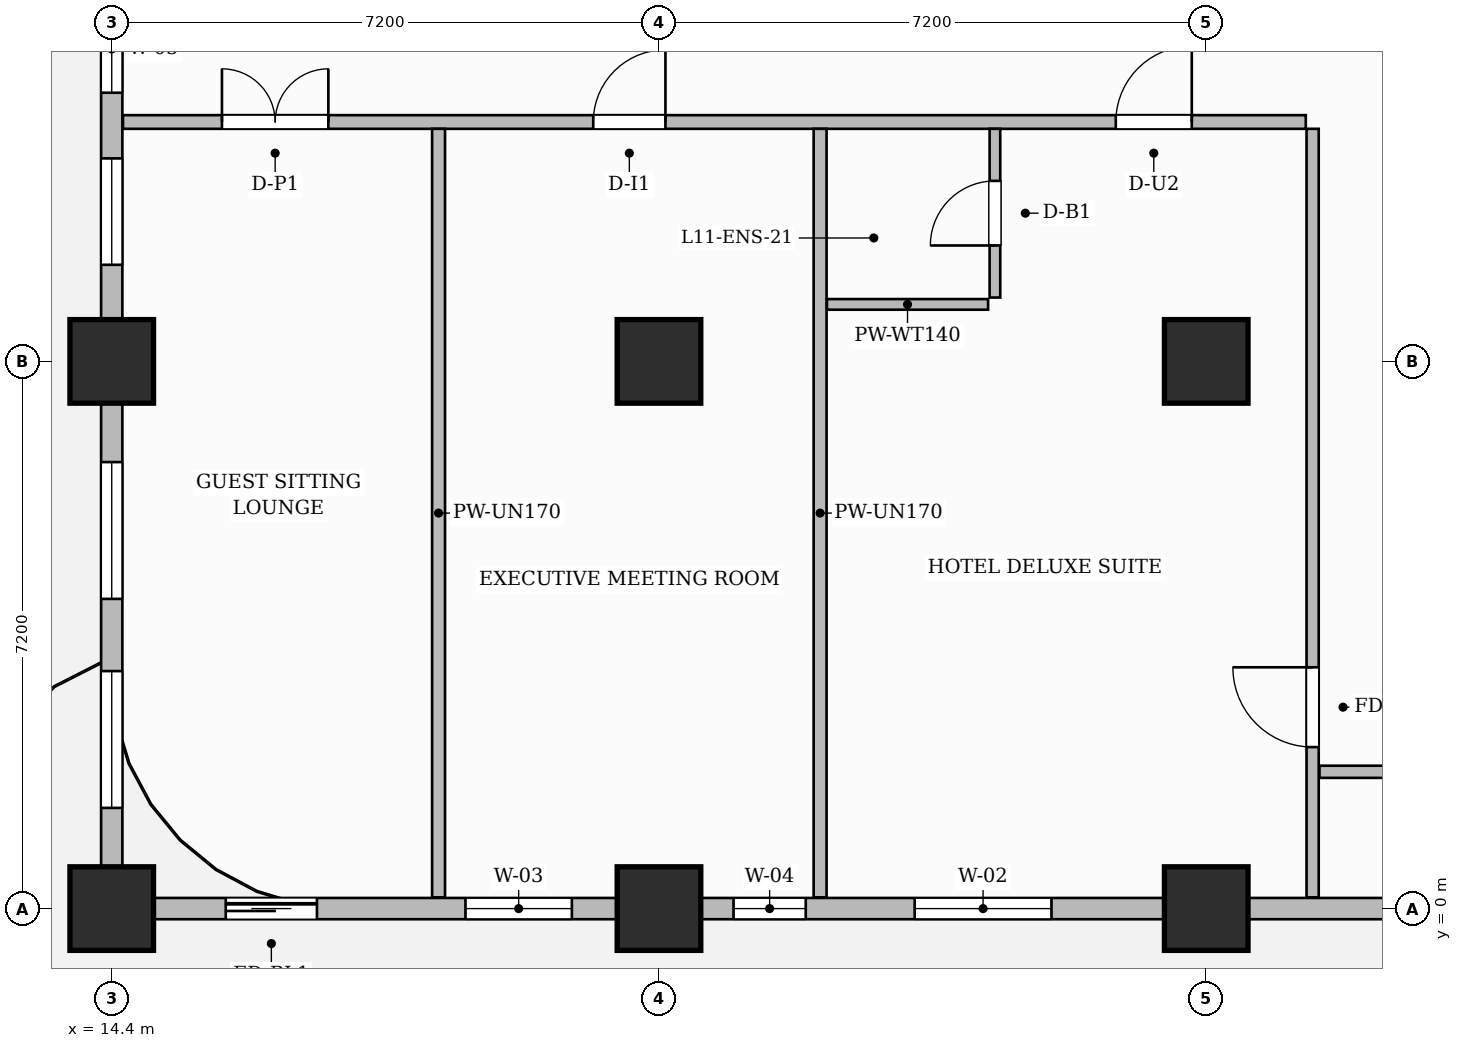
"""IFC4 building model, lengths in metres.
Left out: names, types, materials, properties, quantities, classifications, styles, units other than length and angle.
Written with IfcOpenShell. Run it as: python <this file> out.ifc"""

import sys

from ifc_helpers import new_model, si_unit, direction, frame, frame_2d, origin, origin_2d, place, context, subcontext, project, spatial, rectangle, extrude, source, transform, mapped, element, fill, save


model = new_model("IFC4")
c1 = context("Model", 3, precision=1e-05, world=origin(), true_north=direction((0.0, 1.0)))
c2 = subcontext(c1, "Body", "Model", "MODEL_VIEW")
j1 = project(units=[si_unit("LENGTHUNIT", "METRE"), si_unit("PLANEANGLEUNIT", "RADIAN")], contexts=[c1])
p1 = place(None, origin())
s1 = spatial("IfcSite", under=j1, at=p1, CompositionType="ELEMENT")
p2 = place(p1, origin())
s2 = spatial("IfcBuilding", under=s1, at=p2, CompositionType="ELEMENT")
p3 = place(p2, frame((0.0, 0.0, 50.9)))
s3 = spatial("IfcBuildingStorey", under=s2, at=p3, CompositionType="ELEMENT", Elevation=50.9)
m1 = source(origin(), c2, "Body", "SweptSolid", [
    extrude(rectangle(XDim=1.1, YDim=1.1, at=origin_2d()), origin(), (0.0, 0.0, 1.0), 3.7),
])
for number, where, z_axis, x_axis in (
    (1, (14.4, 0.0, 0.0), (0.0, 0.0, 1.0), (1.0, 0.0, 0.0)),
    (2, (14.4, 7.2, 0.0), (0.0, 0.0, 1.0), (1.0, 0.0, 0.0)),
    (3, (21.6, 0.0, 0.0), (0.0, 0.0, 1.0), (1.0, 0.0, 0.0)),
    (4, (21.6, 7.2, 0.0), (0.0, 0.0, 1.0), (1.0, 0.0, 0.0)),
    (5, (28.8, 0.0, 0.0), (0.0, 0.0, 1.0), (1.0, 0.0, 0.0)),
    (6, (28.8, 7.2, 0.0), (0.0, 0.0, 1.0), (1.0, 0.0, 0.0)),
):
    element("IfcColumn", number, at=place(p3, frame(where, z_axis=z_axis, x_axis=x_axis)), inside=s3, PredefinedType="COLUMN", context=c2, shape_type="MappedRepresentation", body=[
        mapped(m1, transform((0.0, 0.0, 0.0), scale=1.0)),
    ])
p4 = place(p3, frame((14.548, 10.35, 0.0), z_axis=(0.0, 0.0, 1.0), x_axis=(1.0, 0.0, 0.0)))
e7 = element("IfcWall", 7, at=p4, inside=s3, PredefinedType="PARTITIONING", context=c2, shape_type="SweptSolid", body=[
    extrude(rectangle(XDim=15.562, YDim=0.18, at=frame_2d((7.781, 0.0))), origin(), (0.0, 0.0, 1.0), 3.45),
])
p5 = place(p4, frame((1.302, 0.0, 0.0)))
e8 = element("IfcOpeningElement", 8, at=p5, cuts=e7, PredefinedType="OPENING", context=c2, shape_type="SweptSolid", body=[
    extrude(rectangle(XDim=1.4, YDim=2.35, at=frame_2d((0.7, 1.175))), frame((0.0, 0.1, 0.0), z_axis=(0.0, -1.0, 0.0), x_axis=(1.0, 0.0, 0.0)), (0.0, 0.0, 1.0), 0.2),
])
p6 = place(p4, frame((6.187, 0.0, 0.0)))
e9 = element("IfcOpeningElement", 9, at=p6, cuts=e7, PredefinedType="OPENING", context=c2, shape_type="SweptSolid", body=[
    extrude(rectangle(XDim=0.95, YDim=2.15, at=frame_2d((0.475, 1.075))), frame((0.0, 0.1, 0.0), z_axis=(0.0, -1.0, 0.0), x_axis=(1.0, 0.0, 0.0)), (0.0, 0.0, 1.0), 0.2),
])
p7 = place(p4, frame((13.062, 0.0, 0.0)))
e10 = element("IfcOpeningElement", 10, at=p7, cuts=e7, PredefinedType="OPENING", context=c2, shape_type="SweptSolid", body=[
    extrude(rectangle(XDim=1.0, YDim=2.2, at=frame_2d((0.5, 1.1))), frame((0.0, 0.1, 0.0), z_axis=(0.0, -1.0, 0.0), x_axis=(1.0, 0.0, 0.0)), (0.0, 0.0, 1.0), 0.2),
])
p8 = place(p3, frame((30.2, 0.148, 0.0), z_axis=(0.0, 0.0, 1.0), x_axis=(0.0, 1.0, 0.0)))
e11 = element("IfcWall", 11, at=p8, inside=s3, PredefinedType="PARTITIONING", context=c2, shape_type="SweptSolid", body=[
    extrude(rectangle(XDim=10.112, YDim=0.16, at=frame_2d((5.056, 0.0))), origin(), (0.0, 0.0, 1.0), 3.45),
])
p9 = place(p8, frame((1.977, 0.0, 0.0)))
e12 = element("IfcOpeningElement", 12, at=p9, cuts=e11, PredefinedType="OPENING", context=c2, shape_type="SweptSolid", body=[
    extrude(rectangle(XDim=1.05, YDim=2.15, at=frame_2d((0.525, 1.075))), frame((0.0, 0.09, 0.0), z_axis=(0.0, -1.0, 0.0), x_axis=(1.0, 0.0, 0.0)), (0.0, 0.0, 1.0), 0.18),
])
p10 = place(p3, frame((30.29, 1.8, 0.0), z_axis=(0.0, 0.0, 1.0), x_axis=(1.0, 0.0, 0.0)))
e13 = element("IfcWall", 13, at=p10, inside=s3, PredefinedType="PARTITIONING", context=c2, shape_type="SweptSolid", body=[
    extrude(rectangle(XDim=19.37, YDim=0.16, at=frame_2d((9.685, 0.0))), origin(), (0.0, 0.0, 1.0), 3.45),
])
p11 = place(p10, frame((2.916, 0.0, 0.0)))
e14 = element("IfcOpeningElement", 14, at=p11, cuts=e13, PredefinedType="OPENING", context=c2, shape_type="SweptSolid", body=[
    extrude(rectangle(XDim=0.9, YDim=2.15, at=frame_2d((0.45, 1.075))), frame((0.0, 0.09, 0.0), z_axis=(0.0, -1.0, 0.0), x_axis=(1.0, 0.0, 0.0)), (0.0, 0.0, 1.0), 0.18),
])
p12 = place(p10, frame((9.66, 0.0, 0.0)))
e15 = element("IfcOpeningElement", 15, at=p12, cuts=e13, PredefinedType="OPENING", context=c2, shape_type="SweptSolid", body=[
    extrude(rectangle(XDim=0.9, YDim=2.15, at=frame_2d((0.45, 1.075))), frame((0.0, 0.09, 0.0), z_axis=(0.0, -1.0, 0.0), x_axis=(1.0, 0.0, 0.0)), (0.0, 0.0, 1.0), 0.18),
])
p13 = place(p10, frame((15.86, 0.0, 0.0)))
e16 = element("IfcOpeningElement", 16, at=p13, cuts=e13, PredefinedType="OPENING", context=c2, shape_type="SweptSolid", body=[
    extrude(rectangle(XDim=0.9, YDim=2.15, at=frame_2d((0.45, 1.075))), frame((0.0, 0.09, 0.0), z_axis=(0.0, -1.0, 0.0), x_axis=(1.0, 0.0, 0.0)), (0.0, 0.0, 1.0), 0.18),
])
for number, where, z_axis, x_axis in (
    (17, (18.7, 0.148, 0.0), (0.0, 0.0, 1.0), (0.0, 1.0, 0.0)),
    (18, (23.72, 0.148, 0.0), (0.0, 0.0, 1.0), (0.0, 1.0, 0.0)),
):
    element("IfcWall", number, at=place(p3, frame(where, z_axis=z_axis, x_axis=x_axis)), inside=s3, PredefinedType="PARTITIONING", context=c2, shape_type="SweptSolid", body=[
        extrude(rectangle(XDim=10.112, YDim=0.17, at=frame_2d((5.056, 0.0))), origin(), (0.0, 0.0, 1.0), 3.45),
    ])
p14 = place(p3, frame((26.02, 8.04, 0.0), z_axis=(0.0, 0.0, 1.0), x_axis=(0.0, 1.0, 0.0)))
e19 = element("IfcWall", 19, at=p14, inside=s3, PredefinedType="PARTITIONING", context=c2, shape_type="SweptSolid", body=[
    extrude(rectangle(XDim=2.22, YDim=0.14, at=frame_2d((1.11, 0.0))), origin(), (0.0, 0.0, 1.0), 3.45),
])
p15 = place(p14, frame((0.685, 0.0, 0.0)))
e20 = element("IfcOpeningElement", 20, at=p15, cuts=e19, PredefinedType="OPENING", context=c2, shape_type="SweptSolid", body=[
    extrude(rectangle(XDim=0.85, YDim=2.1, at=frame_2d((0.425, 1.05))), frame((0.0, 0.08, 0.0), z_axis=(0.0, -1.0, 0.0), x_axis=(1.0, 0.0, 0.0)), (0.0, 0.0, 1.0), 0.16),
])
p16 = place(p3, frame((23.81, 7.95, 0.0), z_axis=(0.0, 0.0, 1.0), x_axis=(1.0, 0.0, 0.0)))
e21 = element("IfcWall", 21, at=p16, inside=s3, PredefinedType="PARTITIONING", context=c2, shape_type="SweptSolid", body=[
    extrude(rectangle(XDim=2.12, YDim=0.14, at=frame_2d((1.06, 0.0))), origin(), (0.0, 0.0, 1.0), 3.45),
])
p17 = place(p3, frame((14.4, 0.0, 0.0), z_axis=(0.0, 0.0, 1.0), x_axis=(1.0, 0.0, 0.0)))
e22 = element("IfcWall", 22, at=p17, inside=s3, PredefinedType="SOLIDWALL", context=c2, shape_type="SweptSolid", body=[
    extrude(rectangle(XDim=43.2, YDim=0.28, at=frame_2d((21.6, 0.0))), origin(), (0.0, 0.0, 1.0), 2.885),
])
p18 = place(p17, frame((1.5, 0.0, 0.0)))
e23 = element("IfcOpeningElement", 23, at=p18, cuts=e22, PredefinedType="OPENING", context=c2, shape_type="SweptSolid", body=[
    extrude(rectangle(XDim=1.2, YDim=2.2, at=frame_2d((0.6, 1.1))), frame((0.0, 0.15, 0.0), z_axis=(0.0, -1.0, 0.0), x_axis=(1.0, 0.0, 0.0)), (0.0, 0.0, 1.0), 0.3),
])
p19 = place(p17, frame((4.654, 0.0, 0.8)))
e24 = element("IfcOpeningElement", 24, at=p19, cuts=e22, PredefinedType="OPENING", context=c2, shape_type="SweptSolid", body=[
    extrude(rectangle(XDim=1.4, YDim=1.85, at=frame_2d((0.7, 0.925))), frame((0.0, 0.15, 0.0), z_axis=(0.0, -1.0, 0.0), x_axis=(1.0, 0.0, 0.0)), (0.0, 0.0, 1.0), 0.3),
])
p20 = place(p17, frame((8.181, 0.0, 0.8)))
e25 = element("IfcOpeningElement", 25, at=p20, cuts=e22, PredefinedType="OPENING", context=c2, shape_type="SweptSolid", body=[
    extrude(rectangle(XDim=0.95, YDim=1.75, at=frame_2d((0.475, 0.875))), frame((0.0, 0.15, 0.0), z_axis=(0.0, -1.0, 0.0), x_axis=(1.0, 0.0, 0.0)), (0.0, 0.0, 1.0), 0.3),
])
p21 = place(p17, frame((10.564, 0.0, 0.8)))
e26 = element("IfcOpeningElement", 26, at=p21, cuts=e22, PredefinedType="OPENING", context=c2, shape_type="SweptSolid", body=[
    extrude(rectangle(XDim=1.8, YDim=1.85, at=frame_2d((0.9, 0.925))), frame((0.0, 0.15, 0.0), z_axis=(0.0, -1.0, 0.0), x_axis=(1.0, 0.0, 0.0)), (0.0, 0.0, 1.0), 0.3),
])
p22 = place(p17, frame((16.804, 0.0, 0.8)))
e27 = element("IfcOpeningElement", 27, at=p22, cuts=e22, PredefinedType="OPENING", context=c2, shape_type="SweptSolid", body=[
    extrude(rectangle(XDim=1.8, YDim=1.85, at=frame_2d((0.9, 0.925))), frame((0.0, 0.15, 0.0), z_axis=(0.0, -1.0, 0.0), x_axis=(1.0, 0.0, 0.0)), (0.0, 0.0, 1.0), 0.3),
])
p23 = place(p17, frame((21.521, 0.0, 0.8)))
e28 = element("IfcOpeningElement", 28, at=p23, cuts=e22, PredefinedType="OPENING", context=c2, shape_type="SweptSolid", body=[
    extrude(rectangle(XDim=0.95, YDim=1.75, at=frame_2d((0.475, 0.875))), frame((0.0, 0.15, 0.0), z_axis=(0.0, -1.0, 0.0), x_axis=(1.0, 0.0, 0.0)), (0.0, 0.0, 1.0), 0.3),
])
p24 = place(p17, frame((23.904, 0.0, 0.8)))
e29 = element("IfcOpeningElement", 29, at=p24, cuts=e22, PredefinedType="OPENING", context=c2, shape_type="SweptSolid", body=[
    extrude(rectangle(XDim=1.8, YDim=1.85, at=frame_2d((0.9, 0.925))), frame((0.0, 0.15, 0.0), z_axis=(0.0, -1.0, 0.0), x_axis=(1.0, 0.0, 0.0)), (0.0, 0.0, 1.0), 0.3),
])
p25 = place(p17, frame((29.681, 0.0, 0.8)))
e30 = element("IfcOpeningElement", 30, at=p25, cuts=e22, PredefinedType="OPENING", context=c2, shape_type="SweptSolid", body=[
    extrude(rectangle(XDim=1.8, YDim=1.85, at=frame_2d((0.9, 0.925))), frame((0.0, 0.15, 0.0), z_axis=(0.0, -1.0, 0.0), x_axis=(1.0, 0.0, 0.0)), (0.0, 0.0, 1.0), 0.3),
])
p26 = place(p17, frame((32.327, 0.0, 0.8)))
e31 = element("IfcOpeningElement", 31, at=p26, cuts=e22, PredefinedType="OPENING", context=c2, shape_type="SweptSolid", body=[
    extrude(rectangle(XDim=1.8, YDim=1.85, at=frame_2d((0.9, 0.925))), frame((0.0, 0.15, 0.0), z_axis=(0.0, -1.0, 0.0), x_axis=(1.0, 0.0, 0.0)), (0.0, 0.0, 1.0), 0.3),
])
p27 = place(p17, frame((36.875, 0.0, 0.8)))
e32 = element("IfcOpeningElement", 32, at=p27, cuts=e22, PredefinedType="OPENING", context=c2, shape_type="SweptSolid", body=[
    extrude(rectangle(XDim=1.8, YDim=1.85, at=frame_2d((0.9, 0.925))), frame((0.0, 0.15, 0.0), z_axis=(0.0, -1.0, 0.0), x_axis=(1.0, 0.0, 0.0)), (0.0, 0.0, 1.0), 0.3),
])
p28 = place(p17, frame((39.925, 0.0, 0.8)))
e33 = element("IfcOpeningElement", 33, at=p28, cuts=e22, PredefinedType="OPENING", context=c2, shape_type="SweptSolid", body=[
    extrude(rectangle(XDim=1.8, YDim=1.85, at=frame_2d((0.9, 0.925))), frame((0.0, 0.15, 0.0), z_axis=(0.0, -1.0, 0.0), x_axis=(1.0, 0.0, 0.0)), (0.0, 0.0, 1.0), 0.3),
])
p29 = place(p3, frame((14.4, 0.05, 0.0), z_axis=(0.0, 0.0, 1.0), x_axis=(0.0, 1.0, 0.0)))
e34 = element("IfcWall", 34, at=p29, inside=s3, PredefinedType="SOLIDWALL", context=c2, shape_type="SweptSolid", body=[
    extrude(rectangle(XDim=21.5, YDim=0.28, at=frame_2d((10.75, 0.0))), origin(), (0.0, 0.0, 1.0), 2.885),
])
p30 = place(p29, frame((1.275, 0.0, 0.8)))
e35 = element("IfcOpeningElement", 35, at=p30, cuts=e34, PredefinedType="OPENING", context=c2, shape_type="SweptSolid", body=[
    extrude(rectangle(XDim=1.8, YDim=1.85, at=frame_2d((0.9, 0.925))), frame((0.0, 0.15, 0.0), z_axis=(0.0, -1.0, 0.0), x_axis=(1.0, 0.0, 0.0)), (0.0, 0.0, 1.0), 0.3),
])
p31 = place(p29, frame((4.025, 0.0, 0.8)))
e36 = element("IfcOpeningElement", 36, at=p31, cuts=e34, PredefinedType="OPENING", context=c2, shape_type="SweptSolid", body=[
    extrude(rectangle(XDim=1.8, YDim=1.85, at=frame_2d((0.9, 0.925))), frame((0.0, 0.15, 0.0), z_axis=(0.0, -1.0, 0.0), x_axis=(1.0, 0.0, 0.0)), (0.0, 0.0, 1.0), 0.3),
])
p32 = place(p29, frame((8.421, 0.0, 0.8)))
e37 = element("IfcOpeningElement", 37, at=p32, cuts=e34, PredefinedType="OPENING", context=c2, shape_type="SweptSolid", body=[
    extrude(rectangle(XDim=1.4, YDim=1.85, at=frame_2d((0.7, 0.925))), frame((0.0, 0.15, 0.0), z_axis=(0.0, -1.0, 0.0), x_axis=(1.0, 0.0, 0.0)), (0.0, 0.0, 1.0), 0.3),
])
p33 = place(p29, frame((10.685, 0.0, 0.8)))
e38 = element("IfcOpeningElement", 38, at=p33, cuts=e34, PredefinedType="OPENING", context=c2, shape_type="SweptSolid", body=[
    extrude(rectangle(XDim=1.15, YDim=1.8, at=frame_2d((0.575, 0.9))), frame((0.0, 0.15, 0.0), z_axis=(0.0, -1.0, 0.0), x_axis=(1.0, 0.0, 0.0)), (0.0, 0.0, 1.0), 0.3),
])
p34 = place(p29, frame((12.414, 0.0, 0.8)))
e39 = element("IfcOpeningElement", 39, at=p34, cuts=e34, PredefinedType="OPENING", context=c2, shape_type="SweptSolid", body=[
    extrude(rectangle(XDim=0.95, YDim=1.75, at=frame_2d((0.475, 0.875))), frame((0.0, 0.15, 0.0), z_axis=(0.0, -1.0, 0.0), x_axis=(1.0, 0.0, 0.0)), (0.0, 0.0, 1.0), 0.3),
])
p35 = place(p29, frame((15.675, 0.0, 0.8)))
e40 = element("IfcOpeningElement", 40, at=p35, cuts=e34, PredefinedType="OPENING", context=c2, shape_type="SweptSolid", body=[
    extrude(rectangle(XDim=1.8, YDim=1.85, at=frame_2d((0.9, 0.925))), frame((0.0, 0.15, 0.0), z_axis=(0.0, -1.0, 0.0), x_axis=(1.0, 0.0, 0.0)), (0.0, 0.0, 1.0), 0.3),
])
p36 = place(p29, frame((18.425, 0.0, 0.8)))
e41 = element("IfcOpeningElement", 41, at=p36, cuts=e34, PredefinedType="OPENING", context=c2, shape_type="SweptSolid", body=[
    extrude(rectangle(XDim=1.8, YDim=1.85, at=frame_2d((0.9, 0.925))), frame((0.0, 0.15, 0.0), z_axis=(0.0, -1.0, 0.0), x_axis=(1.0, 0.0, 0.0)), (0.0, 0.0, 1.0), 0.3),
])
m2 = source(origin(), c2, "Body", "SweptSolid", [
    extrude(rectangle(XDim=1.05, YDim=2.15, at=frame_2d((0.525, 1.075))), frame((0.0, 0.025, 0.0), z_axis=(0.0, -1.0, 0.0), x_axis=(1.0, 0.0, 0.0)), (0.0, 0.0, 1.0), 0.05),
])
p37 = place(p9, origin())
e42 = element("IfcDoor", 42, at=p37, inside=s3, OperationType="SINGLE_SWING_RIGHT", PredefinedType="DOOR", context=c2, shape_type="MappedRepresentation", body=[
    mapped(m2, transform((0.0, 0.0, 0.0), scale=1.0)),
])
fill(e12, e42)
m3 = source(origin(), c2, "Body", "SweptSolid", [
    extrude(rectangle(XDim=1.4, YDim=2.35, at=frame_2d((0.7, 1.175))), frame((0.0, 0.025, 0.0), z_axis=(0.0, -1.0, 0.0), x_axis=(1.0, 0.0, 0.0)), (0.0, 0.0, 1.0), 0.05),
])
p38 = place(p5, origin())
e43 = element("IfcDoor", 43, at=p38, inside=s3, OperationType="DOUBLE_DOOR_SINGLE_SWING", PredefinedType="DOOR", context=c2, shape_type="MappedRepresentation", body=[
    mapped(m3, transform((0.0, 0.0, 0.0), scale=1.0)),
])
fill(e8, e43)
m4 = source(origin(), c2, "Body", "SweptSolid", [
    extrude(rectangle(XDim=0.95, YDim=2.15, at=frame_2d((0.475, 1.075))), frame((0.0, 0.025, 0.0), z_axis=(0.0, -1.0, 0.0), x_axis=(1.0, 0.0, 0.0)), (0.0, 0.0, 1.0), 0.05),
])
p39 = place(p6, origin())
e44 = element("IfcDoor", 44, at=p39, inside=s3, OperationType="SINGLE_SWING_RIGHT", PredefinedType="DOOR", context=c2, shape_type="MappedRepresentation", body=[
    mapped(m4, transform((0.0, 0.0, 0.0), scale=1.0)),
])
fill(e9, e44)
m5 = source(origin(), c2, "Body", "SweptSolid", [
    extrude(rectangle(XDim=0.85, YDim=2.1, at=frame_2d((0.425, 1.05))), frame((0.0, 0.025, 0.0), z_axis=(0.0, -1.0, 0.0), x_axis=(1.0, 0.0, 0.0)), (0.0, 0.0, 1.0), 0.05),
])
p40 = place(p15, origin())
e45 = element("IfcDoor", 45, at=p40, inside=s3, OperationType="SINGLE_SWING_LEFT", PredefinedType="DOOR", context=c2, shape_type="MappedRepresentation", body=[
    mapped(m5, transform((0.0, 0.0, 0.0), scale=1.0)),
])
fill(e20, e45)
m6 = source(origin(), c2, "Body", "SweptSolid", [
    extrude(rectangle(XDim=1.0, YDim=2.2, at=frame_2d((0.5, 1.1))), frame((0.0, 0.025, 0.0), z_axis=(0.0, -1.0, 0.0), x_axis=(1.0, 0.0, 0.0)), (0.0, 0.0, 1.0), 0.05),
])
p41 = place(p7, origin())
e46 = element("IfcDoor", 46, at=p41, inside=s3, OperationType="SINGLE_SWING_RIGHT", PredefinedType="DOOR", context=c2, shape_type="MappedRepresentation", body=[
    mapped(m6, transform((0.0, 0.0, 0.0), scale=1.0)),
])
fill(e10, e46)
m7 = source(origin(), c2, "Body", "SweptSolid", [
    extrude(rectangle(XDim=1.2, YDim=2.2, at=frame_2d((0.6, 1.1))), frame((0.0, 0.025, 0.0), z_axis=(0.0, -1.0, 0.0), x_axis=(1.0, 0.0, 0.0)), (0.0, 0.0, 1.0), 0.05),
])
p42 = place(p18, origin())
e47 = element("IfcDoor", 47, at=p42, inside=s3, OperationType="SLIDING_TO_LEFT", PredefinedType="DOOR", context=c2, shape_type="MappedRepresentation", body=[
    mapped(m7, transform((0.0, 0.0, 0.0), scale=1.0)),
])
fill(e23, e47)
m8 = source(origin(), c2, "Body", "SweptSolid", [
    extrude(rectangle(XDim=1.4, YDim=1.85, at=frame_2d((0.7, 0.925))), frame((0.0, 0.03, 0.0), z_axis=(0.0, -1.0, 0.0), x_axis=(1.0, 0.0, 0.0)), (0.0, 0.0, 1.0), 0.06),
])
p43 = place(p19, origin())
e48 = element("IfcWindow", 48, at=p43, inside=s3, PartitioningType="SINGLE_PANEL", PredefinedType="WINDOW", context=c2, shape_type="MappedRepresentation", body=[
    mapped(m8, transform((0.0, 0.0, 0.0), scale=1.0)),
])
fill(e24, e48)
m9 = source(origin(), c2, "Body", "SweptSolid", [
    extrude(rectangle(XDim=0.95, YDim=1.75, at=frame_2d((0.475, 0.875))), frame((0.0, 0.03, 0.0), z_axis=(0.0, -1.0, 0.0), x_axis=(1.0, 0.0, 0.0)), (0.0, 0.0, 1.0), 0.06),
])
p44 = place(p20, origin())
e49 = element("IfcWindow", 49, at=p44, inside=s3, PartitioningType="SINGLE_PANEL", PredefinedType="WINDOW", context=c2, shape_type="MappedRepresentation", body=[
    mapped(m9, transform((0.0, 0.0, 0.0), scale=1.0)),
])
fill(e25, e49)
m10 = source(origin(), c2, "Body", "SweptSolid", [
    extrude(rectangle(XDim=1.8, YDim=1.85, at=frame_2d((0.9, 0.925))), frame((0.0, 0.03, 0.0), z_axis=(0.0, -1.0, 0.0), x_axis=(1.0, 0.0, 0.0)), (0.0, 0.0, 1.0), 0.06),
])
p45 = place(p21, origin())
e50 = element("IfcWindow", 50, at=p45, inside=s3, PartitioningType="DOUBLE_PANEL_VERTICAL", PredefinedType="WINDOW", context=c2, shape_type="MappedRepresentation", body=[
    mapped(m10, transform((0.0, 0.0, 0.0), scale=1.0)),
])
fill(e26, e50)
p46 = place(p30, origin())
e51 = element("IfcWindow", 51, at=p46, inside=s3, PartitioningType="DOUBLE_PANEL_VERTICAL", PredefinedType="WINDOW", context=c2, shape_type="MappedRepresentation", body=[
    mapped(m10, transform((0.0, 0.0, 0.0), scale=1.0)),
])
fill(e35, e51)
p47 = place(p31, origin())
e52 = element("IfcWindow", 52, at=p47, inside=s3, PartitioningType="DOUBLE_PANEL_VERTICAL", PredefinedType="WINDOW", context=c2, shape_type="MappedRepresentation", body=[
    mapped(m10, transform((0.0, 0.0, 0.0), scale=1.0)),
])
fill(e36, e52)
p48 = place(p32, origin())
e53 = element("IfcWindow", 53, at=p48, inside=s3, PartitioningType="SINGLE_PANEL", PredefinedType="WINDOW", context=c2, shape_type="MappedRepresentation", body=[
    mapped(m8, transform((0.0, 0.0, 0.0), scale=1.0)),
])
fill(e37, e53)
m11 = source(origin(), c2, "Body", "SweptSolid", [
    extrude(rectangle(XDim=1.15, YDim=1.8, at=frame_2d((0.575, 0.9))), frame((0.0, 0.03, 0.0), z_axis=(0.0, -1.0, 0.0), x_axis=(1.0, 0.0, 0.0)), (0.0, 0.0, 1.0), 0.06),
])
p49 = place(p33, origin())
e54 = element("IfcWindow", 54, at=p49, inside=s3, PartitioningType="SINGLE_PANEL", PredefinedType="WINDOW", context=c2, shape_type="MappedRepresentation", body=[
    mapped(m11, transform((0.0, 0.0, 0.0), scale=1.0)),
])
fill(e38, e54)
save(model, sys.argv[1])
